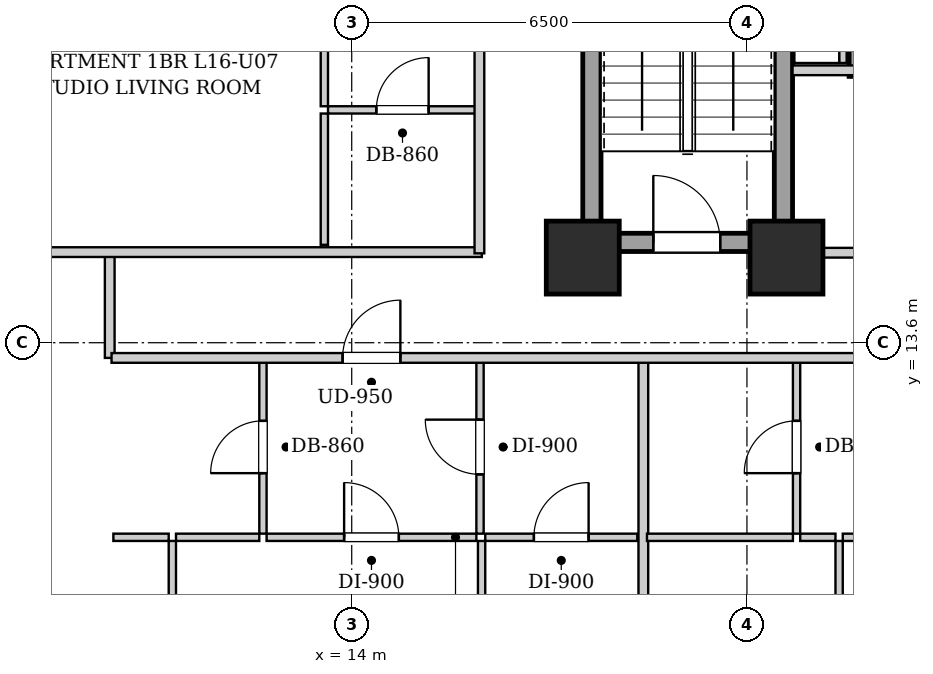
"""IFC4 building model, lengths in metres.
Left out: names, types, materials, properties, quantities, classifications, styles, units other than length and angle.
Written with IfcOpenShell. Run it as: python <this file> out.ifc"""

import sys

from ifc_helpers import new_model, si_unit, direction, frame, frame_2d, origin, origin_2d, place, context, subcontext, project, spatial, rectangle, extrude, element, fill, save


model = new_model("IFC4")
c1 = context("Model", 3, precision=1e-05, world=origin(), true_north=direction((0.0, 1.0)))
c2 = subcontext(c1, "Body", "Model", "MODEL_VIEW")
j1 = project(units=[si_unit("LENGTHUNIT", "METRE"), si_unit("PLANEANGLEUNIT", "RADIAN")], contexts=[c1])
p1 = place(None, origin())
s1 = spatial("IfcSite", under=j1, at=p1, CompositionType="ELEMENT")
p2 = place(p1, origin())
s2 = spatial("IfcBuilding", under=s1, at=p2, CompositionType="ELEMENT")
p3 = place(p2, frame((0.0, 0.0, 61.0)))
s3 = spatial("IfcBuildingStorey", under=s2, at=p3, CompositionType="ELEMENT", Elevation=61.0)
for number, where, z_axis, x_axis in (
    (1, (17.8, 15.0, 0.0), (0.0, 0.0, 1.0), (1.0, 0.0, 0.0)),
    (2, (21.15, 15.0, 0.0), (0.0, 0.0, 1.0), (1.0, 0.0, 0.0)),
):
    element("IfcColumn", number, at=place(p3, frame(where, z_axis=z_axis, x_axis=x_axis)), inside=s3, PredefinedType="COLUMN", context=c2, shape_type="SweptSolid", body=[
        extrude(rectangle(XDim=1.2, YDim=1.2, at=origin_2d()), origin(), (0.0, 0.0, 1.0), 3.2),
    ])
for number, where, z_axis, x_axis in (
    (3, (17.95, 15.1, 0.0), (0.0, 0.0, 1.0), (0.0, 1.0, 0.0)),
    (4, (21.1, 15.1, 0.0), (0.0, 0.0, 1.0), (0.0, 1.0, 0.0)),
):
    element("IfcWall", number, at=place(p3, frame(where, z_axis=z_axis, x_axis=x_axis)), inside=s3, PredefinedType="SHEAR", context=c2, shape_type="SweptSolid", body=[
        extrude(rectangle(XDim=9.0, YDim=0.3, at=frame_2d((4.5, 0.0))), origin(), (0.0, 0.0, 1.0), 2.94),
    ])
p4 = place(p3, frame((18.1, 15.25, 0.0), z_axis=(0.0, 0.0, 1.0), x_axis=(1.0, 0.0, 0.0)))
e5 = element("IfcWall", 5, at=p4, inside=s3, PredefinedType="SHEAR", context=c2, shape_type="SweptSolid", body=[
    extrude(rectangle(XDim=2.85, YDim=0.3, at=frame_2d((1.425, 0.0))), origin(), (0.0, 0.0, 1.0), 2.94),
])
p5 = place(p4, frame((0.86, 0.0, 0.0)))
e6 = element("IfcOpeningElement", 6, at=p5, cuts=e5, PredefinedType="OPENING", context=c2, shape_type="SweptSolid", body=[
    extrude(rectangle(XDim=1.1, YDim=2.05, at=frame_2d((0.55, 1.025))), frame((0.0, 0.16, 0.0), z_axis=(0.0, -1.0, 0.0), x_axis=(1.0, 0.0, 0.0)), (0.0, 0.0, 1.0), 0.32),
])
p6 = place(p3, frame((22.29, 17.98, 0.0), z_axis=(0.0, 0.0, 1.0), x_axis=(0.0, 1.0, 0.0)))
e7 = element("IfcWall", 7, at=p6, inside=s3, PredefinedType="SHEAR", context=c2, shape_type="SweptSolid", body=[
    extrude(rectangle(XDim=2.54, YDim=0.22, at=frame_2d((1.27, 0.0))), origin(), (0.0, 0.0, 1.0), 2.94),
])
p7 = place(p3, frame((21.25, 15.08, 0.0), z_axis=(0.0, 0.0, 1.0), x_axis=(1.0, 0.0, 0.0)))
e8 = element("IfcWall", 8, at=p7, inside=s3, PredefinedType="PARTITIONING", context=c2, shape_type="SweptSolid", body=[
    extrude(rectangle(XDim=8.5, YDim=0.16, at=frame_2d((4.25, 0.0))), origin(), (0.0, 0.0, 1.0), 2.232),
])
p8 = place(p7, frame((3.725, 0.0, 0.0)))
e9 = element("IfcOpeningElement", 9, at=p8, cuts=e8, PredefinedType="OPENING", context=c2, shape_type="SweptSolid", body=[
    extrude(rectangle(XDim=1.05, YDim=2.05, at=frame_2d((0.525, 1.025))), frame((0.0, 0.09, 0.0), z_axis=(0.0, -1.0, 0.0), x_axis=(1.0, 0.0, 0.0)), (0.0, 0.0, 1.0), 0.18),
])
p9 = place(p3, frame((21.25, 18.08, 0.0), z_axis=(0.0, 0.0, 1.0), x_axis=(1.0, 0.0, 0.0)))
e10 = element("IfcWall", 10, at=p9, inside=s3, PredefinedType="PARTITIONING", context=c2, shape_type="SweptSolid", body=[
    extrude(rectangle(XDim=1.1, YDim=0.16, at=frame_2d((0.55, 0.0))), origin(), (0.0, 0.0, 1.0), 2.94),
])
p10 = place(p3, frame((22.08, 18.2, 0.0), z_axis=(0.0, 0.0, 1.0), x_axis=(0.0, 1.0, 0.0)))
e11 = element("IfcWall", 11, at=p10, inside=s3, PredefinedType="PARTITIONING", context=c2, shape_type="SweptSolid", body=[
    extrude(rectangle(XDim=2.12, YDim=0.12, at=frame_2d((1.06, 0.0))), origin(), (0.0, 0.0, 1.0), 2.94),
])
p11 = place(p3, frame((10.02, 13.35, 0.0), z_axis=(0.0, 0.0, 1.0), x_axis=(0.0, 1.0, 0.0)))
e12 = element("IfcWall", 12, at=p11, inside=s3, PredefinedType="PARTITIONING", context=c2, shape_type="SweptSolid", body=[
    extrude(rectangle(XDim=1.74, YDim=0.16, at=frame_2d((0.87, 0.0))), origin(), (0.0, 0.0, 1.0), 2.94),
])
p12 = place(p3, frame((7.78, 15.09, 0.0), z_axis=(0.0, 0.0, 1.0), x_axis=(1.0, 0.0, 0.0)))
e13 = element("IfcWall", 13, at=p12, inside=s3, PredefinedType="PARTITIONING", context=c2, shape_type="SweptSolid", body=[
    extrude(rectangle(XDim=8.36, YDim=0.16, at=frame_2d((4.18, 0.0))), origin(), (0.0, 0.0, 1.0), 2.232),
])
p13 = place(p3, frame((12.54, 10.46, 0.0), z_axis=(0.0, 0.0, 1.0), x_axis=(0.0, 1.0, 0.0)))
e14 = element("IfcWall", 14, at=p13, inside=s3, PredefinedType="PARTITIONING", context=c2, shape_type="SweptSolid", body=[
    extrude(rectangle(XDim=2.85, YDim=0.12, at=frame_2d((1.425, 0.0))), origin(), (0.0, 0.0, 1.0), 2.94),
])
p14 = place(p13, frame((0.995, 0.0, 0.0)))
e15 = element("IfcOpeningElement", 15, at=p14, cuts=e14, PredefinedType="OPENING", context=c2, shape_type="SweptSolid", body=[
    extrude(rectangle(XDim=0.86, YDim=2.05, at=frame_2d((0.43, 1.025))), frame((0.0, 0.07, 0.0), z_axis=(0.0, -1.0, 0.0), x_axis=(1.0, 0.0, 0.0)), (0.0, 0.0, 1.0), 0.14),
])
p15 = place(p3, frame((10.08, 10.4, 0.0), z_axis=(0.0, 0.0, 1.0), x_axis=(1.0, 0.0, 0.0)))
e16 = element("IfcWall", 16, at=p15, inside=s3, PredefinedType="PARTITIONING", context=c2, shape_type="SweptSolid", body=[
    extrude(rectangle(XDim=0.91, YDim=0.12, at=frame_2d((0.455, 0.0))), origin(), (0.0, 0.0, 1.0), 2.94),
])
p16 = place(p3, frame((11.11, 10.4, 0.0), z_axis=(0.0, 0.0, 1.0), x_axis=(1.0, 0.0, 0.0)))
e17 = element("IfcWall", 17, at=p16, inside=s3, PredefinedType="PARTITIONING", context=c2, shape_type="SweptSolid", body=[
    extrude(rectangle(XDim=1.37, YDim=0.12, at=frame_2d((0.685, 0.0))), origin(), (0.0, 0.0, 1.0), 2.94),
])
p17 = place(p3, frame((16.11, 10.46, 0.0), z_axis=(0.0, 0.0, 1.0), x_axis=(0.0, 1.0, 0.0)))
e18 = element("IfcWall", 18, at=p17, inside=s3, PredefinedType="PARTITIONING", context=c2, shape_type="SweptSolid", body=[
    extrude(rectangle(XDim=2.85, YDim=0.12, at=frame_2d((1.425, 0.0))), origin(), (0.0, 0.0, 1.0), 2.94),
])
p18 = place(p17, frame((0.975, 0.0, 0.0)))
e19 = element("IfcOpeningElement", 19, at=p18, cuts=e18, PredefinedType="OPENING", context=c2, shape_type="SweptSolid", body=[
    extrude(rectangle(XDim=0.9, YDim=2.05, at=frame_2d((0.45, 1.025))), frame((0.0, 0.07, 0.0), z_axis=(0.0, -1.0, 0.0), x_axis=(1.0, 0.0, 0.0)), (0.0, 0.0, 1.0), 0.14),
])
p19 = place(p3, frame((12.6, 10.4, 0.0), z_axis=(0.0, 0.0, 1.0), x_axis=(1.0, 0.0, 0.0)))
e20 = element("IfcWall", 20, at=p19, inside=s3, PredefinedType="PARTITIONING", context=c2, shape_type="SweptSolid", body=[
    extrude(rectangle(XDim=3.45, YDim=0.12, at=frame_2d((1.725, 0.0))), origin(), (0.0, 0.0, 1.0), 2.94),
])
p20 = place(p19, frame((1.275, 0.0, 0.0)))
e21 = element("IfcOpeningElement", 21, at=p20, cuts=e20, PredefinedType="OPENING", context=c2, shape_type="SweptSolid", body=[
    extrude(rectangle(XDim=0.9, YDim=2.05, at=frame_2d((0.45, 1.025))), frame((0.0, 0.07, 0.0), z_axis=(0.0, -1.0, 0.0), x_axis=(1.0, 0.0, 0.0)), (0.0, 0.0, 1.0), 0.14),
])
p21 = place(p3, frame((16.196, 10.4, 0.0), z_axis=(0.0, 0.0, 1.0), x_axis=(1.0, 0.0, 0.0)))
e22 = element("IfcWall", 22, at=p21, inside=s3, PredefinedType="PARTITIONING", context=c2, shape_type="SweptSolid", body=[
    extrude(rectangle(XDim=2.5, YDim=0.12, at=frame_2d((1.25, 0.0))), origin(), (0.0, 0.0, 1.0), 2.94),
])
p22 = place(p21, frame((0.8, 0.0, 0.0)))
e23 = element("IfcOpeningElement", 23, at=p22, cuts=e22, PredefinedType="OPENING", context=c2, shape_type="SweptSolid", body=[
    extrude(rectangle(XDim=0.9, YDim=2.05, at=frame_2d((0.45, 1.025))), frame((0.0, 0.07, 0.0), z_axis=(0.0, -1.0, 0.0), x_axis=(1.0, 0.0, 0.0)), (0.0, 0.0, 1.0), 0.14),
])
p23 = place(p3, frame((11.05, 0.28, 0.0), z_axis=(0.0, 0.0, 1.0), x_axis=(0.0, 1.0, 0.0)))
e24 = element("IfcWall", 24, at=p23, inside=s3, PredefinedType="PARTITIONING", context=c2, shape_type="SweptSolid", body=[
    extrude(rectangle(XDim=10.06, YDim=0.12, at=frame_2d((5.03, 0.0))), origin(), (0.0, 0.0, 1.0), 2.94),
])
p24 = place(p23, frame((4.565, 0.0, 0.0)))
e25 = element("IfcOpeningElement", 25, at=p24, cuts=e24, PredefinedType="OPENING", context=c2, shape_type="SweptSolid", body=[
    extrude(rectangle(XDim=0.9, YDim=2.05, at=frame_2d((0.45, 1.025))), frame((0.0, 0.07, 0.0), z_axis=(0.0, -1.0, 0.0), x_axis=(1.0, 0.0, 0.0)), (0.0, 0.0, 1.0), 0.14),
])
p25 = place(p3, frame((16.136, 2.43, 0.0), z_axis=(0.0, 0.0, 1.0), x_axis=(0.0, 1.0, 0.0)))
e26 = element("IfcWall", 26, at=p25, inside=s3, PredefinedType="PARTITIONING", context=c2, shape_type="SweptSolid", body=[
    extrude(rectangle(XDim=7.91, YDim=0.12, at=frame_2d((3.955, 0.0))), origin(), (0.0, 0.0, 1.0), 2.94),
])
p26 = place(p25, frame((3.505, 0.0, 0.0)))
e27 = element("IfcOpeningElement", 27, at=p26, cuts=e26, PredefinedType="OPENING", context=c2, shape_type="SweptSolid", body=[
    extrude(rectangle(XDim=0.9, YDim=2.05, at=frame_2d((0.45, 1.025))), frame((0.0, 0.07, 0.0), z_axis=(0.0, -1.0, 0.0), x_axis=(1.0, 0.0, 0.0)), (0.0, 0.0, 1.0), 0.14),
])
p27 = place(p3, frame((18.796, 0.28, 0.0), z_axis=(0.0, 0.0, 1.0), x_axis=(0.0, 1.0, 0.0)))
e28 = element("IfcWall", 28, at=p27, inside=s3, PredefinedType="PARTITIONING", context=c2, shape_type="SweptSolid", body=[
    extrude(rectangle(XDim=13.03, YDim=0.16, at=frame_2d((6.515, 0.0))), origin(), (0.0, 0.0, 1.0), 2.94),
])
p28 = place(p3, frame((21.316, 10.46, 0.0), z_axis=(0.0, 0.0, 1.0), x_axis=(0.0, 1.0, 0.0)))
e29 = element("IfcWall", 29, at=p28, inside=s3, PredefinedType="PARTITIONING", context=c2, shape_type="SweptSolid", body=[
    extrude(rectangle(XDim=2.85, YDim=0.12, at=frame_2d((1.425, 0.0))), origin(), (0.0, 0.0, 1.0), 2.94),
])
p29 = place(p28, frame((0.995, 0.0, 0.0)))
e30 = element("IfcOpeningElement", 30, at=p29, cuts=e29, PredefinedType="OPENING", context=c2, shape_type="SweptSolid", body=[
    extrude(rectangle(XDim=0.86, YDim=2.05, at=frame_2d((0.43, 1.025))), frame((0.0, 0.07, 0.0), z_axis=(0.0, -1.0, 0.0), x_axis=(1.0, 0.0, 0.0)), (0.0, 0.0, 1.0), 0.14),
])
p30 = place(p3, frame((18.856, 10.4, 0.0), z_axis=(0.0, 0.0, 1.0), x_axis=(1.0, 0.0, 0.0)))
e31 = element("IfcWall", 31, at=p30, inside=s3, PredefinedType="PARTITIONING", context=c2, shape_type="SweptSolid", body=[
    extrude(rectangle(XDim=2.4, YDim=0.12, at=frame_2d((1.2, 0.0))), origin(), (0.0, 0.0, 1.0), 2.94),
])
p31 = place(p3, frame((21.376, 10.4, 0.0), z_axis=(0.0, 0.0, 1.0), x_axis=(1.0, 0.0, 0.0)))
e32 = element("IfcWall", 32, at=p31, inside=s3, PredefinedType="PARTITIONING", context=c2, shape_type="SweptSolid", body=[
    extrude(rectangle(XDim=0.58, YDim=0.12, at=frame_2d((0.29, 0.0))), origin(), (0.0, 0.0, 1.0), 2.94),
])
p32 = place(p3, frame((22.076, 10.4, 0.0), z_axis=(0.0, 0.0, 1.0), x_axis=(1.0, 0.0, 0.0)))
e33 = element("IfcWall", 33, at=p32, inside=s3, PredefinedType="PARTITIONING", context=c2, shape_type="SweptSolid", body=[
    extrude(rectangle(XDim=3.1, YDim=0.12, at=frame_2d((1.55, 0.0))), origin(), (0.0, 0.0, 1.0), 2.94),
])
p33 = place(p32, frame((1.1, 0.0, 0.0)))
e34 = element("IfcOpeningElement", 34, at=p33, cuts=e33, PredefinedType="OPENING", context=c2, shape_type="SweptSolid", body=[
    extrude(rectangle(XDim=0.9, YDim=2.05, at=frame_2d((0.45, 1.025))), frame((0.0, 0.07, 0.0), z_axis=(0.0, -1.0, 0.0), x_axis=(1.0, 0.0, 0.0)), (0.0, 0.0, 1.0), 0.14),
])
p34 = place(p3, frame((22.016, 0.28, 0.0), z_axis=(0.0, 0.0, 1.0), x_axis=(0.0, 1.0, 0.0)))
e35 = element("IfcWall", 35, at=p34, inside=s3, PredefinedType="PARTITIONING", context=c2, shape_type="SweptSolid", body=[
    extrude(rectangle(XDim=10.06, YDim=0.12, at=frame_2d((5.03, 0.0))), origin(), (0.0, 0.0, 1.0), 2.94),
])
p35 = place(p34, frame((4.565, 0.0, 0.0)))
e36 = element("IfcOpeningElement", 36, at=p35, cuts=e35, PredefinedType="OPENING", context=c2, shape_type="SweptSolid", body=[
    extrude(rectangle(XDim=0.9, YDim=2.05, at=frame_2d((0.45, 1.025))), frame((0.0, 0.07, 0.0), z_axis=(0.0, -1.0, 0.0), x_axis=(1.0, 0.0, 0.0)), (0.0, 0.0, 1.0), 0.14),
])
p36 = place(p3, frame((13.61, 17.429, 0.0), z_axis=(0.0, 0.0, 1.0), x_axis=(1.0, 0.0, 0.0)))
e37 = element("IfcWall", 37, at=p36, inside=s3, PredefinedType="PARTITIONING", context=c2, shape_type="SweptSolid", body=[
    extrude(rectangle(XDim=2.45, YDim=0.12, at=frame_2d((1.225, 0.0))), origin(), (0.0, 0.0, 1.0), 2.94),
])
p37 = place(p36, frame((0.795, 0.0, 0.0)))
e38 = element("IfcOpeningElement", 38, at=p37, cuts=e37, PredefinedType="OPENING", context=c2, shape_type="SweptSolid", body=[
    extrude(rectangle(XDim=0.86, YDim=2.05, at=frame_2d((0.43, 1.025))), frame((0.0, 0.07, 0.0), z_axis=(0.0, -1.0, 0.0), x_axis=(1.0, 0.0, 0.0)), (0.0, 0.0, 1.0), 0.14),
])
p38 = place(p3, frame((13.55, 15.21, 0.0), z_axis=(0.0, 0.0, 1.0), x_axis=(0.0, 1.0, 0.0)))
e39 = element("IfcWall", 39, at=p38, inside=s3, PredefinedType="PARTITIONING", context=c2, shape_type="SweptSolid", body=[
    extrude(rectangle(XDim=2.159, YDim=0.12, at=frame_2d((1.08, 0.0))), origin(), (0.0, 0.0, 1.0), 2.94),
])
p39 = place(p3, frame((13.55, 17.489, 0.0), z_axis=(0.0, 0.0, 1.0), x_axis=(0.0, 1.0, 0.0)))
e40 = element("IfcWall", 40, at=p39, inside=s3, PredefinedType="PARTITIONING", context=c2, shape_type="SweptSolid", body=[
    extrude(rectangle(XDim=5.433, YDim=0.12, at=frame_2d((2.717, 0.0))), origin(), (0.0, 0.0, 1.0), 2.94),
])
p40 = place(p39, frame((2.266, 0.0, 0.0)))
e41 = element("IfcOpeningElement", 41, at=p40, cuts=e40, PredefinedType="OPENING", context=c2, shape_type="SweptSolid", body=[
    extrude(rectangle(XDim=0.9, YDim=2.05, at=frame_2d((0.45, 1.025))), frame((0.0, 0.07, 0.0), z_axis=(0.0, -1.0, 0.0), x_axis=(1.0, 0.0, 0.0)), (0.0, 0.0, 1.0), 0.14),
])
p41 = place(p3, frame((10.05, 13.35, 0.0), z_axis=(0.0, 0.0, 1.0), x_axis=(1.0, 0.0, 0.0)))
e42 = element("IfcWall", 42, at=p41, inside=s3, PredefinedType="PARTITIONING", context=c2, shape_type="SweptSolid", body=[
    extrude(rectangle(XDim=33.9, YDim=0.16, at=frame_2d((16.95, 0.0))), origin(), (0.0, 0.0, 1.0), 2.94),
])
p42 = place(p41, frame((3.8, 0.0, 0.0)))
e43 = element("IfcOpeningElement", 43, at=p42, cuts=e42, PredefinedType="OPENING", context=c2, shape_type="SweptSolid", body=[
    extrude(rectangle(XDim=0.95, YDim=2.1, at=frame_2d((0.475, 1.05))), frame((0.0, 0.09, 0.0), z_axis=(0.0, -1.0, 0.0), x_axis=(1.0, 0.0, 0.0)), (0.0, 0.0, 1.0), 0.18),
])
p43 = place(p41, frame((13.071, 0.0, 0.0)))
e44 = element("IfcOpeningElement", 44, at=p43, cuts=e42, PredefinedType="OPENING", context=c2, shape_type="SweptSolid", body=[
    extrude(rectangle(XDim=0.95, YDim=2.1, at=frame_2d((0.475, 1.05))), frame((0.0, 0.09, 0.0), z_axis=(0.0, -1.0, 0.0), x_axis=(1.0, 0.0, 0.0)), (0.0, 0.0, 1.0), 0.18),
])
p44 = place(p3, frame((16.1, 15.07, 0.0), z_axis=(0.0, 0.0, 1.0), x_axis=(0.0, 1.0, 0.0)))
e45 = element("IfcWall", 45, at=p44, inside=s3, PredefinedType="PARTITIONING", context=c2, shape_type="SweptSolid", body=[
    extrude(rectangle(XDim=13.93, YDim=0.16, at=frame_2d((6.965, 0.0))), origin(), (0.0, 0.0, 1.0), 2.94),
])
p45 = place(p44, frame((4.661, 0.0, 0.0)))
e46 = element("IfcOpeningElement", 46, at=p45, cuts=e45, PredefinedType="OPENING", context=c2, shape_type="SweptSolid", body=[
    extrude(rectangle(XDim=0.95, YDim=2.1, at=frame_2d((0.475, 1.05))), frame((0.0, 0.09, 0.0), z_axis=(0.0, -1.0, 0.0), x_axis=(1.0, 0.0, 0.0)), (0.0, 0.0, 1.0), 0.18),
])
p46 = place(p44, frame((11.411, 0.0, 0.0)))
e47 = element("IfcOpeningElement", 47, at=p46, cuts=e45, PredefinedType="OPENING", context=c2, shape_type="SweptSolid", body=[
    extrude(rectangle(XDim=0.95, YDim=2.1, at=frame_2d((0.475, 1.05))), frame((0.0, 0.09, 0.0), z_axis=(0.0, -1.0, 0.0), x_axis=(1.0, 0.0, 0.0)), (0.0, 0.0, 1.0), 0.18),
])
p47 = place(p5, origin())
e48 = element("IfcDoor", 48, at=p47, inside=s3, OperationType="SINGLE_SWING_LEFT", PredefinedType="DOOR", context=c2, shape_type="SweptSolid", body=[
    extrude(rectangle(XDim=1.1, YDim=2.05, at=frame_2d((0.55, 1.025))), frame((0.0, 0.025, 0.0), z_axis=(0.0, -1.0, 0.0), x_axis=(1.0, 0.0, 0.0)), (0.0, 0.0, 1.0), 0.05),
])
fill(e6, e48)
p48 = place(p14, origin())
e49 = element("IfcDoor", 49, at=p48, inside=s3, OperationType="SINGLE_SWING_LEFT", PredefinedType="DOOR", context=c2, shape_type="SweptSolid", body=[
    extrude(rectangle(XDim=0.86, YDim=2.05, at=frame_2d((0.43, 1.025))), frame((0.0, 0.025, 0.0), z_axis=(0.0, -1.0, 0.0), x_axis=(1.0, 0.0, 0.0)), (0.0, 0.0, 1.0), 0.05),
])
fill(e15, e49)
p49 = place(p18, origin())
e50 = element("IfcDoor", 50, at=p49, inside=s3, OperationType="SINGLE_SWING_RIGHT", PredefinedType="DOOR", context=c2, shape_type="SweptSolid", body=[
    extrude(rectangle(XDim=0.9, YDim=2.05, at=frame_2d((0.45, 1.025))), frame((0.0, 0.025, 0.0), z_axis=(0.0, -1.0, 0.0), x_axis=(1.0, 0.0, 0.0)), (0.0, 0.0, 1.0), 0.05),
])
fill(e19, e50)
p50 = place(p20, origin())
e51 = element("IfcDoor", 51, at=p50, inside=s3, OperationType="SINGLE_SWING_LEFT", PredefinedType="DOOR", context=c2, shape_type="SweptSolid", body=[
    extrude(rectangle(XDim=0.9, YDim=2.05, at=frame_2d((0.45, 1.025))), frame((0.0, 0.025, 0.0), z_axis=(0.0, -1.0, 0.0), x_axis=(1.0, 0.0, 0.0)), (0.0, 0.0, 1.0), 0.05),
])
fill(e21, e51)
p51 = place(p22, origin())
e52 = element("IfcDoor", 52, at=p51, inside=s3, OperationType="SINGLE_SWING_RIGHT", PredefinedType="DOOR", context=c2, shape_type="SweptSolid", body=[
    extrude(rectangle(XDim=0.9, YDim=2.05, at=frame_2d((0.45, 1.025))), frame((0.0, 0.025, 0.0), z_axis=(0.0, -1.0, 0.0), x_axis=(1.0, 0.0, 0.0)), (0.0, 0.0, 1.0), 0.05),
])
fill(e23, e52)
p52 = place(p29, origin())
e53 = element("IfcDoor", 53, at=p52, inside=s3, OperationType="SINGLE_SWING_LEFT", PredefinedType="DOOR", context=c2, shape_type="SweptSolid", body=[
    extrude(rectangle(XDim=0.86, YDim=2.05, at=frame_2d((0.43, 1.025))), frame((0.0, 0.025, 0.0), z_axis=(0.0, -1.0, 0.0), x_axis=(1.0, 0.0, 0.0)), (0.0, 0.0, 1.0), 0.05),
])
fill(e30, e53)
p53 = place(p37, origin())
e54 = element("IfcDoor", 54, at=p53, inside=s3, OperationType="SINGLE_SWING_RIGHT", PredefinedType="DOOR", context=c2, shape_type="SweptSolid", body=[
    extrude(rectangle(XDim=0.86, YDim=2.05, at=frame_2d((0.43, 1.025))), frame((0.0, 0.025, 0.0), z_axis=(0.0, -1.0, 0.0), x_axis=(1.0, 0.0, 0.0)), (0.0, 0.0, 1.0), 0.05),
])
fill(e38, e54)
p54 = place(p42, origin())
e55 = element("IfcDoor", 55, at=p54, inside=s3, OperationType="SINGLE_SWING_RIGHT", PredefinedType="DOOR", context=c2, shape_type="SweptSolid", body=[
    extrude(rectangle(XDim=0.95, YDim=2.1, at=frame_2d((0.475, 1.05))), frame((0.0, 0.025, 0.0), z_axis=(0.0, -1.0, 0.0), x_axis=(1.0, 0.0, 0.0)), (0.0, 0.0, 1.0), 0.05),
])
fill(e43, e55)
save(model, sys.argv[1])
